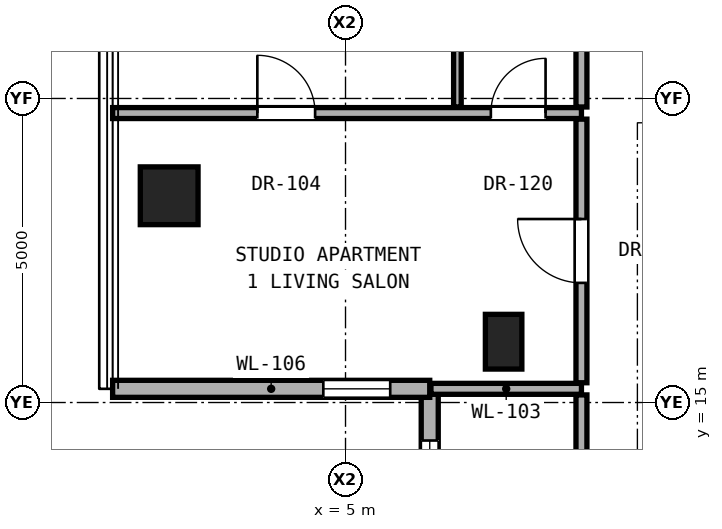
"""IFC4 building model, lengths in metres.
Left out: names, types, materials, properties, quantities, classifications, styles, units other than length and angle.
Written with IfcOpenShell. Run it as: python <this file> out.ifc"""

import sys

from ifc_helpers import new_model, si_unit, direction, frame, frame_2d, origin, origin_2d, place, context, subcontext, project, spatial, rectangle, hollow_rectangle, extrude, element, fill, save


model = new_model("IFC4")
c1 = context("Model", 3, precision=1e-05, world=origin(), true_north=direction((0.0, 1.0)))
c2 = subcontext(c1, "Body", "Model", "MODEL_VIEW")
j1 = project(units=[si_unit("LENGTHUNIT", "METRE"), si_unit("PLANEANGLEUNIT", "RADIAN")], contexts=[c1])
p1 = place(None, origin())
s1 = spatial("IfcSite", under=j1, at=p1, CompositionType="ELEMENT")
p2 = place(p1, origin())
s2 = spatial("IfcBuilding", under=s1, at=p2, CompositionType="ELEMENT")
p3 = place(p2, frame((0.0, 0.0, 183.65)))
s3 = spatial("IfcBuildingStorey", under=s2, at=p3, CompositionType="ELEMENT", Elevation=183.65)
p4 = place(p3, frame((2.1, 18.4, 0.0), z_axis=(0.0, 0.0, 1.0), x_axis=(1.0, 0.0, 0.0)))
e1 = element("IfcColumn", 1, at=p4, inside=s3, PredefinedType="COLUMN", context=c2, shape_type="SweptSolid", body=[
    extrude(hollow_rectangle(XDim=0.95, YDim=0.95, WallThickness=0.05, at=origin_2d()), origin(), (0.0, 0.0, 1.0), 3.25),
])
p5 = place(p3, frame((7.6, 16.0, 0.0), z_axis=(0.0, 0.0, 1.0), x_axis=(1.0, 0.0, 0.0)))
e2 = element("IfcColumn", 2, at=p5, inside=s3, PredefinedType="PILASTER", context=c2, shape_type="SweptSolid", body=[
    extrude(rectangle(XDim=0.6, YDim=0.9, at=origin_2d()), origin(), (0.0, 0.0, 1.0), 3.25),
])
p6 = place(p3, frame((6.385, 15.225, 0.0), z_axis=(0.0, 0.0, 1.0), x_axis=(0.0, -1.0, 0.0)))
e3 = element("IfcWall", 3, at=p6, inside=s3, PredefinedType="SOLIDWALL", context=c2, shape_type="SweptSolid", body=[
    extrude(rectangle(XDim=5.215, YDim=0.28, at=frame_2d((2.607, 0.0))), origin(), (0.0, 0.0, 1.0), 3.03),
])
p7 = place(p6, frame((0.85, 0.0, 0.68)))
e4 = element("IfcOpeningElement", 4, at=p7, cuts=e3, PredefinedType="OPENING", context=c2, shape_type="SweptSolid", body=[
    extrude(rectangle(XDim=2.1, YDim=2.2, at=frame_2d((1.05, 1.1))), frame((0.0, 0.15, 0.0), z_axis=(0.0, -1.0, 0.0), x_axis=(1.0, 0.0, 0.0)), (0.0, 0.0, 1.0), 0.3),
])
p8 = place(p3, frame((1.17, 15.225, 0.0), z_axis=(0.0, 0.0, 1.0), x_axis=(1.0, 0.0, 0.0)))
e5 = element("IfcWall", 5, at=p8, inside=s3, PredefinedType="SOLIDWALL", context=c2, shape_type="SweptSolid", body=[
    extrude(rectangle(XDim=5.215, YDim=0.28, at=frame_2d((2.607, 0.0))), origin(), (0.0, 0.0, 1.0), 3.03),
])
p9 = place(p8, frame((3.465, 0.0, 0.85)))
e6 = element("IfcOpeningElement", 6, at=p9, cuts=e5, PredefinedType="OPENING", context=c2, shape_type="SweptSolid", body=[
    extrude(rectangle(XDim=1.1, YDim=2.0, at=frame_2d((0.55, 1.0))), frame((0.0, 0.15, 0.0), z_axis=(0.0, -1.0, 0.0), x_axis=(1.0, 0.0, 0.0)), (0.0, 0.0, 1.0), 0.3),
])
p10 = place(p3, frame((6.405, 15.225, 0.0), z_axis=(0.0, 0.0, 1.0), x_axis=(1.0, 0.0, 0.0)))
e7 = element("IfcWall", 7, at=p10, inside=s3, PredefinedType="PARTITIONING", context=c2, shape_type="SweptSolid", body=[
    extrude(rectangle(XDim=2.475, YDim=0.18, at=frame_2d((1.237, 0.0))), origin(), (0.0, 0.0, 1.0), 3.05),
])
p11 = place(p3, frame((1.17, 19.76, 0.0), z_axis=(0.0, 0.0, 1.0), x_axis=(1.0, 0.0, 0.0)))
e8 = element("IfcWall", 8, at=p11, inside=s3, PredefinedType="PARTITIONING", context=c2, shape_type="SweptSolid", body=[
    extrude(rectangle(XDim=7.71, YDim=0.18, at=frame_2d((3.855, 0.0))), origin(), (0.0, 0.0, 1.0), 2.269),
])
p12 = place(p11, frame((2.38, 0.0, 0.0)))
e9 = element("IfcOpeningElement", 9, at=p12, cuts=e8, PredefinedType="OPENING", context=c2, shape_type="SweptSolid", body=[
    extrude(rectangle(XDim=0.95, YDim=2.15, at=frame_2d((0.475, 1.075))), frame((0.0, 0.1, 0.0), z_axis=(0.0, -1.0, 0.0), x_axis=(1.0, 0.0, 0.0)), (0.0, 0.0, 1.0), 0.2),
])
p13 = place(p11, frame((6.22, 0.0, 0.0)))
e10 = element("IfcOpeningElement", 10, at=p13, cuts=e8, PredefinedType="OPENING", context=c2, shape_type="SweptSolid", body=[
    extrude(rectangle(XDim=0.9, YDim=2.1, at=frame_2d((0.45, 1.05))), frame((0.0, 0.1, 0.0), z_axis=(0.0, -1.0, 0.0), x_axis=(1.0, 0.0, 0.0)), (0.0, 0.0, 1.0), 0.2),
])
p14 = place(p3, frame((6.84, 19.86, 0.0), z_axis=(0.0, 0.0, 1.0), x_axis=(0.0, 1.0, 0.0)))
e11 = element("IfcWall", 11, at=p14, inside=s3, PredefinedType="PARTITIONING", context=c2, shape_type="SweptSolid", body=[
    extrude(rectangle(XDim=2.52, YDim=0.125, at=frame_2d((1.26, 0.0))), origin(), (0.0, 0.0, 1.0), 3.05),
])
p15 = place(p3, frame((8.88, 10.01, 0.0), z_axis=(0.0, 0.0, 1.0), x_axis=(0.0, 1.0, 0.0)))
e12 = element("IfcWall", 12, at=p15, inside=s3, PredefinedType="PARTITIONING", context=c2, shape_type="SweptSolid", body=[
    extrude(rectangle(XDim=5.115, YDim=0.18, at=frame_2d((2.558, 0.0))), origin(), (0.0, 0.0, 1.0), 3.05),
])
p16 = place(p15, frame((2.083, 0.0, 0.0)))
e13 = element("IfcOpeningElement", 13, at=p16, cuts=e12, PredefinedType="OPENING", context=c2, shape_type="SweptSolid", body=[
    extrude(rectangle(XDim=0.95, YDim=2.15, at=frame_2d((0.475, 1.075))), frame((0.0, 0.1, 0.0), z_axis=(0.0, -1.0, 0.0), x_axis=(1.0, 0.0, 0.0)), (0.0, 0.0, 1.0), 0.2),
])
p17 = place(p3, frame((8.88, 15.325, 0.0), z_axis=(0.0, 0.0, 1.0), x_axis=(0.0, 1.0, 0.0)))
e14 = element("IfcWall", 14, at=p17, inside=s3, PredefinedType="PARTITIONING", context=c2, shape_type="SweptSolid", body=[
    extrude(rectangle(XDim=4.335, YDim=0.18, at=frame_2d((2.167, 0.0))), origin(), (0.0, 0.0, 1.0), 2.442),
])
p18 = place(p17, frame((1.643, 0.0, 0.0)))
e15 = element("IfcOpeningElement", 15, at=p18, cuts=e14, PredefinedType="OPENING", context=c2, shape_type="SweptSolid", body=[
    extrude(rectangle(XDim=1.05, YDim=2.2, at=frame_2d((0.525, 1.1))), frame((0.0, 0.1, 0.0), z_axis=(0.0, -1.0, 0.0), x_axis=(1.0, 0.0, 0.0)), (0.0, 0.0, 1.0), 0.2),
])
p19 = place(p3, frame((8.88, 19.86, 0.0), z_axis=(0.0, 0.0, 1.0), x_axis=(0.0, 1.0, 0.0)))
e16 = element("IfcWall", 16, at=p19, inside=s3, PredefinedType="PARTITIONING", context=c2, shape_type="SweptSolid", body=[
    extrude(rectangle(XDim=2.52, YDim=0.18, at=frame_2d((1.26, 0.0))), origin(), (0.0, 0.0, 1.0), 3.05),
])
p20 = place(p7, origin())
e17 = element("IfcWindow", 17, at=p20, inside=s3, PartitioningType="SINGLE_PANEL", PredefinedType="WINDOW", context=c2, shape_type="SweptSolid", body=[
    extrude(rectangle(XDim=2.1, YDim=2.2, at=frame_2d((1.05, 1.1))), frame((0.0, 0.03, 0.0), z_axis=(0.0, -1.0, 0.0), x_axis=(1.0, 0.0, 0.0)), (0.0, 0.0, 1.0), 0.06),
])
fill(e4, e17)
p21 = place(p9, origin())
e18 = element("IfcWindow", 18, at=p21, inside=s3, PartitioningType="SINGLE_PANEL", PredefinedType="WINDOW", context=c2, shape_type="SweptSolid", body=[
    extrude(rectangle(XDim=1.1, YDim=2.0, at=frame_2d((0.55, 1.0))), frame((0.0, 0.03, 0.0), z_axis=(0.0, -1.0, 0.0), x_axis=(1.0, 0.0, 0.0)), (0.0, 0.0, 1.0), 0.06),
])
fill(e6, e18)
p22 = place(p18, origin())
e19 = element("IfcDoor", 19, at=p22, inside=s3, OperationType="SINGLE_SWING_RIGHT", PredefinedType="DOOR", context=c2, shape_type="SweptSolid", body=[
    extrude(rectangle(XDim=1.05, YDim=2.2, at=frame_2d((0.525, 1.1))), frame((0.0, 0.025, 0.0), z_axis=(0.0, -1.0, 0.0), x_axis=(1.0, 0.0, 0.0)), (0.0, 0.0, 1.0), 0.05),
])
fill(e15, e19)
p23 = place(p12, origin())
e20 = element("IfcDoor", 20, at=p23, inside=s3, OperationType="SINGLE_SWING_LEFT", PredefinedType="DOOR", context=c2, shape_type="SweptSolid", body=[
    extrude(rectangle(XDim=0.95, YDim=2.15, at=frame_2d((0.475, 1.075))), frame((0.0, 0.025, 0.0), z_axis=(0.0, -1.0, 0.0), x_axis=(1.0, 0.0, 0.0)), (0.0, 0.0, 1.0), 0.05),
])
fill(e9, e20)
p24 = place(p13, origin())
e21 = element("IfcDoor", 21, at=p24, inside=s3, OperationType="SINGLE_SWING_RIGHT", PredefinedType="DOOR", context=c2, shape_type="SweptSolid", body=[
    extrude(rectangle(XDim=0.9, YDim=2.1, at=frame_2d((0.45, 1.05))), frame((0.0, 0.025, 0.0), z_axis=(0.0, -1.0, 0.0), x_axis=(1.0, 0.0, 0.0)), (0.0, 0.0, 1.0), 0.05),
])
fill(e10, e21)
save(model, sys.argv[1])
